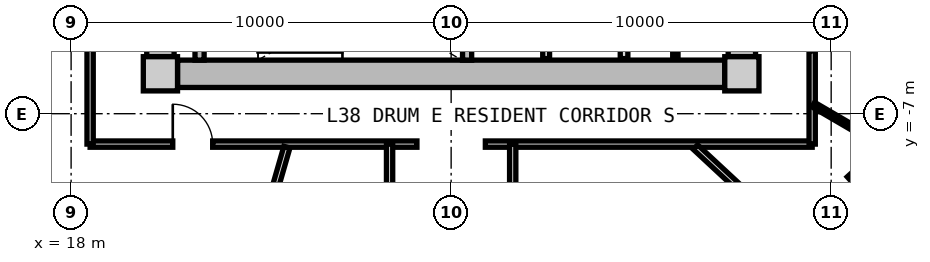
"""IFC4 building model, lengths in metres.
Left out: names, types, materials, properties, quantities, classifications, styles, units other than length and angle.
Written with IfcOpenShell. Run it as: python <this file> out.ifc"""

import sys

from ifc_helpers import new_model, si_unit, direction, frame, frame_2d, origin, origin_2d, place, context, subcontext, project, spatial, rectangle, extrude, source, transform, mapped, element, fill, save


model = new_model("IFC4")
c1 = context("Model", 3, precision=1e-05, world=origin(), true_north=direction((0.0, 1.0)))
c2 = subcontext(c1, "Body", "Model", "MODEL_VIEW")
j1 = project(units=[si_unit("LENGTHUNIT", "METRE"), si_unit("PLANEANGLEUNIT", "RADIAN")], contexts=[c1])
p1 = place(None, origin())
s1 = spatial("IfcSite", under=j1, at=p1, CompositionType="ELEMENT")
p2 = place(p1, origin())
s2 = spatial("IfcBuilding", under=s1, at=p2, CompositionType="ELEMENT")
p3 = place(p2, frame((0.0, 0.0, 123.7)))
s3 = spatial("IfcBuildingStorey", under=s2, at=p3, CompositionType="ELEMENT", Elevation=123.7)
m1 = source(origin(), c2, "Body", "SweptSolid", [
    extrude(rectangle(XDim=0.9, YDim=0.9, at=origin_2d()), origin(), (0.0, 0.0, 1.0), 3.05),
])
for number, where, z_axis, x_axis in (
    (1, (20.35, -5.95, 0.0), (0.0, 0.0, 1.0), (1.0, 0.0, 0.0)),
    (2, (35.65, -5.95, 0.0), (0.0, 0.0, 1.0), (1.0, 0.0, 0.0)),
):
    element("IfcColumn", number, at=place(p3, frame(where, z_axis=z_axis, x_axis=x_axis)), inside=s3, PredefinedType="COLUMN", context=c2, shape_type="MappedRepresentation", body=[
        mapped(m1, transform((0.0, 0.0, 0.0), x_axis=(1.0, 0.0, 0.0), y_axis=(0.0, 1.0, 0.0), z_axis=(0.0, 0.0, 1.0), scale=1.0)),
    ])
m2 = source(origin(), c2, "Body", "SweptSolid", [
    extrude(rectangle(XDim=14.4, YDim=0.72, at=frame_2d((7.2, 0.0))), origin(), (0.0, 0.0, 1.0), 2.79),
])
p4 = place(p3, frame((35.2, -5.95, 0.0), z_axis=(0.0, 0.0, 1.0), x_axis=(-1.0, 0.0, 0.0)))
e3 = element("IfcWall", 3, at=p4, inside=s3, PredefinedType="SHEAR", context=c2, shape_type="MappedRepresentation", body=[
    mapped(m2, transform((0.0, 0.0, 0.0), x_axis=(1.0, 0.0, 0.0), y_axis=(0.0, 1.0, 0.0), z_axis=(0.0, 0.0, 1.0), scale=1.0)),
])
m3 = source(origin(), c2, "Body", "SweptSolid", [
    extrude(rectangle(XDim=11.0, YDim=0.72, at=frame_2d((5.5, 0.0))), origin(), (0.0, 0.0, 1.0), 2.79),
])
p5 = place(p3, frame((20.35, -5.5, 0.0), z_axis=(0.0, 0.0, 1.0), x_axis=(0.0, 1.0, 0.0)))
e4 = element("IfcWall", 4, at=p5, inside=s3, PredefinedType="SHEAR", context=c2, shape_type="MappedRepresentation", body=[
    mapped(m3, transform((0.0, 0.0, 0.0), x_axis=(1.0, 0.0, 0.0), y_axis=(0.0, 1.0, 0.0), z_axis=(0.0, 0.0, 1.0), scale=1.0)),
])
p6 = place(p5, frame((3.8, 0.0, 0.0)))
e5 = element("IfcOpeningElement", 5, at=p6, cuts=e4, PredefinedType="OPENING", context=c2, shape_type="SweptSolid", body=[
    extrude(rectangle(XDim=1.2, YDim=2.15, at=frame_2d((0.6, 1.075))), frame((0.0, 0.37, 0.0), z_axis=(0.0, -1.0, 0.0), x_axis=(1.0, 0.0, 0.0)), (0.0, 0.0, 1.0), 0.74),
])
p7 = place(p3, frame((35.65, 5.5, 0.0), z_axis=(0.0, 0.0, 1.0), x_axis=(0.0, -1.0, 0.0)))
e6 = element("IfcWall", 6, at=p7, inside=s3, PredefinedType="SHEAR", context=c2, shape_type="MappedRepresentation", body=[
    mapped(m3, transform((0.0, 0.0, 0.0), x_axis=(1.0, 0.0, 0.0), y_axis=(0.0, 1.0, 0.0), z_axis=(0.0, 0.0, 1.0), scale=1.0)),
])
p8 = place(p7, frame((5.65, 0.0, 0.0)))
e7 = element("IfcOpeningElement", 7, at=p8, cuts=e6, PredefinedType="OPENING", context=c2, shape_type="SweptSolid", body=[
    extrude(rectangle(XDim=1.2, YDim=2.15, at=frame_2d((0.6, 1.075))), frame((0.0, 0.37, 0.0), z_axis=(0.0, -1.0, 0.0), x_axis=(1.0, 0.0, 0.0)), (0.0, 0.0, 1.0), 0.74),
])
m4 = source(origin(), c2, "Body", "SweptSolid", [
    extrude(rectangle(XDim=3.14, YDim=0.24, at=frame_2d((1.57, 0.0))), origin(), (0.0, 0.0, 1.0), 2.79),
])
for number, where, z_axis, x_axis in (
    (8, (21.38, -5.59, 0.0), (0.0, 0.0, 1.0), (0.0, 1.0, 0.0)),
    (9, (28.42, -5.59, 0.0), (0.0, 0.0, 1.0), (0.0, 1.0, 0.0)),
):
    element("IfcWall", number, at=place(p3, frame(where, z_axis=z_axis, x_axis=x_axis)), inside=s3, PredefinedType="PARTITIONING", context=c2, shape_type="MappedRepresentation", body=[
        mapped(m4, transform((0.0, 0.0, 0.0), x_axis=(1.0, 0.0, 0.0), y_axis=(0.0, 1.0, 0.0), z_axis=(0.0, 0.0, 1.0), scale=1.0)),
    ])
m5 = source(origin(), c2, "Body", "SweptSolid", [
    extrude(rectangle(XDim=3.8, YDim=0.2, at=frame_2d((1.9, 0.0))), origin(), (0.0, 0.0, 1.0), 2.775),
])
p9 = place(p3, frame((32.55, -5.55, 0.0), z_axis=(0.0, 0.0, 1.0), x_axis=(0.0, 1.0, 0.0)))
e10 = element("IfcWall", 10, at=p9, inside=s3, PredefinedType="PARTITIONING", context=c2, shape_type="MappedRepresentation", body=[
    mapped(m5, transform((0.0, 0.0, 0.0), x_axis=(1.0, 0.0, 0.0), y_axis=(0.0, 1.0, 0.0), z_axis=(0.0, 0.0, 1.0), scale=1.0)),
])
m6 = source(origin(), c2, "Body", "SweptSolid", [
    extrude(rectangle(XDim=3.22, YDim=0.18, at=frame_2d((1.61, 0.0))), origin(), (0.0, 0.0, 1.0), 2.775),
])
p10 = place(p3, frame((30.5, -5.55, 0.0), z_axis=(0.0, 0.0, 1.0), x_axis=(0.0, 1.0, 0.0)))
e11 = element("IfcWall", 11, at=p10, inside=s3, PredefinedType="PARTITIONING", context=c2, shape_type="MappedRepresentation", body=[
    mapped(m6, transform((0.0, 0.0, 0.0), x_axis=(1.0, 0.0, 0.0), y_axis=(0.0, 1.0, 0.0), z_axis=(0.0, 0.0, 1.0), scale=1.0)),
])
m7 = source(origin(), c2, "Body", "SweptSolid", [
    extrude(rectangle(XDim=3.8, YDim=0.14, at=frame_2d((1.9, 0.0))), origin(), (0.0, 0.0, 1.0), 2.775),
])
p11 = place(p3, frame((33.9, -5.55, 0.0), z_axis=(0.0, 0.0, 1.0), x_axis=(0.0, 1.0, 0.0)))
e12 = element("IfcWall", 12, at=p11, inside=s3, PredefinedType="PARTITIONING", context=c2, shape_type="MappedRepresentation", body=[
    mapped(m7, transform((0.0, 0.0, 0.0), x_axis=(1.0, 0.0, 0.0), y_axis=(0.0, 1.0, 0.0), z_axis=(0.0, 0.0, 1.0), scale=1.0)),
])
m8 = source(origin(), c2, "Body", "SweptSolid", [
    extrude(rectangle(XDim=8.6, YDim=0.165, at=frame_2d((4.3, 0.0))), origin(), (0.0, 0.0, 1.0), 2.775),
])
p12 = place(p3, frame((37.5, -7.8, 0.0), z_axis=(0.0, 0.0, 1.0), x_axis=(-1.0, 0.0, 0.0)))
e13 = element("IfcWall", 13, at=p12, inside=s3, PredefinedType="PARTITIONING", context=c2, shape_type="MappedRepresentation", body=[
    mapped(m8, transform((0.0, 0.0, 0.0), x_axis=(1.0, 0.0, 0.0), y_axis=(0.0, 1.0, 0.0), z_axis=(0.0, 0.0, 1.0), scale=1.0)),
])
p13 = place(p3, frame((27.1, -7.8, 0.0), z_axis=(0.0, 0.0, 1.0), x_axis=(-1.0, 0.0, 0.0)))
e14 = element("IfcWall", 14, at=p13, inside=s3, PredefinedType="PARTITIONING", context=c2, shape_type="MappedRepresentation", body=[
    mapped(m8, transform((0.0, 0.0, 0.0), x_axis=(1.0, 0.0, 0.0), y_axis=(0.0, 1.0, 0.0), z_axis=(0.0, 0.0, 1.0), scale=1.0)),
])
p14 = place(p13, frame((5.375, 0.0, 0.0)))
e15 = element("IfcOpeningElement", 15, at=p14, cuts=e14, PredefinedType="OPENING", context=c2, shape_type="SweptSolid", body=[
    extrude(rectangle(XDim=1.05, YDim=2.15, at=frame_2d((0.525, 1.075))), frame((0.0, 0.093, 0.0), z_axis=(0.0, -1.0, 0.0), x_axis=(1.0, 0.0, 0.0)), (0.0, 0.0, 1.0), 0.185),
])
m9 = source(origin(), c2, "Body", "SweptSolid", [
    extrude(rectangle(XDim=15.6, YDim=0.165, at=frame_2d((7.8, 0.0))), origin(), (0.0, 0.0, 1.0), 2.775),
])
p15 = place(p3, frame((18.5, -7.8, 0.0), z_axis=(0.0, 0.0, 1.0), x_axis=(0.0, 1.0, 0.0)))
e16 = element("IfcWall", 16, at=p15, inside=s3, PredefinedType="PARTITIONING", context=c2, shape_type="MappedRepresentation", body=[
    mapped(m9, transform((0.0, 0.0, 0.0), x_axis=(1.0, 0.0, 0.0), y_axis=(0.0, 1.0, 0.0), z_axis=(0.0, 0.0, 1.0), scale=1.0)),
])
p16 = place(p15, frame((10.383, 0.0, 0.0)))
e17 = element("IfcOpeningElement", 17, at=p16, cuts=e16, PredefinedType="OPENING", context=c2, shape_type="SweptSolid", body=[
    extrude(rectangle(XDim=1.05, YDim=2.15, at=frame_2d((0.525, 1.075))), frame((0.0, 0.093, 0.0), z_axis=(0.0, -1.0, 0.0), x_axis=(1.0, 0.0, 0.0)), (0.0, 0.0, 1.0), 0.185),
])
p17 = place(p15, frame((6.419, 0.0, 0.0)))
e18 = element("IfcOpeningElement", 18, at=p17, cuts=e16, PredefinedType="OPENING", context=c2, shape_type="SweptSolid", body=[
    extrude(rectangle(XDim=1.05, YDim=2.15, at=frame_2d((0.525, 1.075))), frame((0.0, 0.093, 0.0), z_axis=(0.0, -1.0, 0.0), x_axis=(1.0, 0.0, 0.0)), (0.0, 0.0, 1.0), 0.185),
])
p18 = place(p3, frame((37.5, 7.8, 0.0), z_axis=(0.0, 0.0, 1.0), x_axis=(0.0, -1.0, 0.0)))
e19 = element("IfcWall", 19, at=p18, inside=s3, PredefinedType="PARTITIONING", context=c2, shape_type="MappedRepresentation", body=[
    mapped(m9, transform((0.0, 0.0, 0.0), x_axis=(1.0, 0.0, 0.0), y_axis=(0.0, 1.0, 0.0), z_axis=(0.0, 0.0, 1.0), scale=1.0)),
])
p19 = place(p18, frame((12.094, 0.0, 0.0)))
e20 = element("IfcOpeningElement", 20, at=p19, cuts=e19, PredefinedType="OPENING", context=c2, shape_type="SweptSolid", body=[
    extrude(rectangle(XDim=1.05, YDim=2.15, at=frame_2d((0.525, 1.075))), frame((0.0, 0.093, 0.0), z_axis=(0.0, -1.0, 0.0), x_axis=(1.0, 0.0, 0.0)), (0.0, 0.0, 1.0), 0.185),
])
p20 = place(p18, frame((5.971, 0.0, 0.0)))
e21 = element("IfcOpeningElement", 21, at=p20, cuts=e19, PredefinedType="OPENING", context=c2, shape_type="SweptSolid", body=[
    extrude(rectangle(XDim=1.05, YDim=2.15, at=frame_2d((0.525, 1.075))), frame((0.0, 0.093, 0.0), z_axis=(0.0, -1.0, 0.0), x_axis=(1.0, 0.0, 0.0)), (0.0, 0.0, 1.0), 0.185),
])
p21 = place(p18, frame((3.324, 0.0, 0.0)))
e22 = element("IfcOpeningElement", 22, at=p21, cuts=e19, PredefinedType="OPENING", context=c2, shape_type="SweptSolid", body=[
    extrude(rectangle(XDim=0.92, YDim=2.1, at=frame_2d((0.46, 1.05))), frame((0.0, 0.093, 0.0), z_axis=(0.0, -1.0, 0.0), x_axis=(1.0, 0.0, 0.0)), (0.0, 0.0, 1.0), 0.185),
])
m10 = source(origin(), c2, "Body", "SweptSolid", [
    extrude(rectangle(XDim=8.989, YDim=0.165, at=frame_2d((4.495, 0.0))), origin(), (0.0, 0.0, 1.0), 2.275),
])
p22 = place(p3, frame((23.678, -7.88, 0.0), z_axis=(0.0, 0.0, 1.0), x_axis=(-0.27702323008, -0.960863221274, 0.0)))
e23 = element("IfcWall", 23, at=p22, inside=s3, PredefinedType="PARTITIONING", context=c2, shape_type="MappedRepresentation", body=[
    mapped(m10, transform((0.0, 0.0, 0.0), x_axis=(1.0, 0.0, 0.0), y_axis=(0.0, 1.0, 0.0), z_axis=(0.0, 0.0, 1.0), scale=1.0)),
])
m11 = source(origin(), c2, "Body", "SweptSolid", [
    extrude(rectangle(XDim=6.187, YDim=0.165, at=frame_2d((3.093, 0.0))), origin(), (0.0, 0.0, 1.0), 2.275),
])
p23 = place(p3, frame((34.429, -7.88, 0.0), z_axis=(0.0, 0.0, 1.0), x_axis=(0.732501077882, -0.680765870841, 0.0)))
e24 = element("IfcWall", 24, at=p23, inside=s3, PredefinedType="PARTITIONING", context=c2, shape_type="MappedRepresentation", body=[
    mapped(m11, transform((0.0, 0.0, 0.0), x_axis=(1.0, 0.0, 0.0), y_axis=(0.0, 1.0, 0.0), z_axis=(0.0, 0.0, 1.0), scale=1.0)),
])
m12 = source(origin(), c2, "Body", "SweptSolid", [
    extrude(rectangle(XDim=6.99, YDim=0.165, at=frame_2d((3.495, 0.0))), origin(), (0.0, 0.0, 1.0), 2.775),
])
p24 = place(p3, frame((26.38, -14.79, 0.0), z_axis=(0.0, 0.0, 1.0), x_axis=(0.0, 1.0, 0.0)))
e25 = element("IfcWall", 25, at=p24, inside=s3, PredefinedType="PARTITIONING", context=c2, shape_type="MappedRepresentation", body=[
    mapped(m12, transform((0.0, 0.0, 0.0), x_axis=(1.0, 0.0, 0.0), y_axis=(0.0, 1.0, 0.0), z_axis=(0.0, 0.0, 1.0), scale=1.0)),
])
p25 = place(p24, frame((2.97, 0.0, 0.0)))
e26 = element("IfcOpeningElement", 26, at=p25, cuts=e25, PredefinedType="OPENING", context=c2, shape_type="SweptSolid", body=[
    extrude(rectangle(XDim=1.05, YDim=2.15, at=frame_2d((0.525, 1.075))), frame((0.0, 0.093, 0.0), z_axis=(0.0, -1.0, 0.0), x_axis=(1.0, 0.0, 0.0)), (0.0, 0.0, 1.0), 0.185),
])
m13 = source(origin(), c2, "Body", "SweptSolid", [
    extrude(rectangle(XDim=6.99, YDim=0.165, at=frame_2d((3.495, 0.0))), origin(), (0.0, 0.0, 1.0), 2.275),
])
p26 = place(p3, frame((29.62, -14.79, 0.0), z_axis=(0.0, 0.0, 1.0), x_axis=(0.0, 1.0, 0.0)))
e27 = element("IfcWall", 27, at=p26, inside=s3, PredefinedType="PARTITIONING", context=c2, shape_type="MappedRepresentation", body=[
    mapped(m13, transform((0.0, 0.0, 0.0), x_axis=(1.0, 0.0, 0.0), y_axis=(0.0, 1.0, 0.0), z_axis=(0.0, 0.0, 1.0), scale=1.0)),
])
p27 = place(p26, frame((2.97, 0.0, 0.0)))
e28 = element("IfcOpeningElement", 28, at=p27, cuts=e27, PredefinedType="OPENING", context=c2, shape_type="SweptSolid", body=[
    extrude(rectangle(XDim=1.05, YDim=2.15, at=frame_2d((0.525, 1.075))), frame((0.0, 0.093, 0.0), z_axis=(0.0, -1.0, 0.0), x_axis=(1.0, 0.0, 0.0)), (0.0, 0.0, 1.0), 0.185),
])
m14 = source(origin(), c2, "Body", "SweptSolid", [
    extrude(rectangle(XDim=2.172, YDim=0.14, at=frame_2d((1.086, 0.0))), origin(), (0.0, 0.0, 1.0), 2.775),
])
p28 = place(p3, frame((37.53, -6.762, 0.0), z_axis=(0.0, 0.0, 1.0), x_axis=(0.863562702562, -0.504241468688, 0.0)))
e29 = element("IfcWall", 29, at=p28, inside=s3, PredefinedType="PARTITIONING", context=c2, shape_type="MappedRepresentation", body=[
    mapped(m14, transform((0.0, 0.0, 0.0), x_axis=(1.0, 0.0, 0.0), y_axis=(0.0, 1.0, 0.0), z_axis=(0.0, 0.0, 1.0), scale=1.0)),
])
m15 = source(origin(), c2, "Body", "SweptSolid", [
    extrude(rectangle(XDim=3.457, YDim=0.14, at=frame_2d((1.729, 0.0))), origin(), (0.0, 0.0, 1.0), 2.775),
])
p29 = place(p3, frame((39.405, -7.857, 0.0), z_axis=(0.0, 0.0, 1.0), x_axis=(-0.737567375492, -0.675273549467, 0.0)))
e30 = element("IfcWall", 30, at=p29, inside=s3, PredefinedType="PARTITIONING", context=c2, shape_type="MappedRepresentation", body=[
    mapped(m15, transform((0.0, 0.0, 0.0), x_axis=(1.0, 0.0, 0.0), y_axis=(0.0, 1.0, 0.0), z_axis=(0.0, 0.0, 1.0), scale=1.0)),
])
p30 = place(p29, frame((1.268, 0.0, 0.0)))
e31 = element("IfcOpeningElement", 31, at=p30, cuts=e30, PredefinedType="OPENING", context=c2, shape_type="SweptSolid", body=[
    extrude(rectangle(XDim=0.92, YDim=2.1, at=frame_2d((0.46, 1.05))), frame((0.0, 0.08, 0.0), z_axis=(0.0, -1.0, 0.0), x_axis=(1.0, 0.0, 0.0)), (0.0, 0.0, 1.0), 0.16),
])
m16 = source(origin(), c2, "Body", "SweptSolid", [
    extrude(rectangle(XDim=1.05, YDim=2.15, at=frame_2d((0.525, 1.075))), frame((0.0, 0.025, 0.0), z_axis=(0.0, -1.0, 0.0), x_axis=(1.0, 0.0, 0.0)), (0.0, 0.0, 1.0), 0.05),
])
p31 = place(p14, frame((1.05, 0.0, 0.0), z_axis=(0.0, 0.0, 1.0), x_axis=(-1.0, 0.0, 0.0)))
e32 = element("IfcDoor", 32, at=p31, inside=s3, OperationType="SINGLE_SWING_LEFT", PredefinedType="DOOR", context=c2, shape_type="MappedRepresentation", body=[
    mapped(m16, transform((0.0, 0.0, 0.0), x_axis=(1.0, 0.0, 0.0), y_axis=(0.0, 1.0, 0.0), z_axis=(0.0, 0.0, 1.0), scale=1.0)),
])
fill(e15, e32)
m17 = source(origin(), c2, "Body", "SweptSolid", [
    extrude(rectangle(XDim=0.92, YDim=2.1, at=frame_2d((0.46, 1.05))), frame((0.0, 0.025, 0.0), z_axis=(0.0, -1.0, 0.0), x_axis=(1.0, 0.0, 0.0)), (0.0, 0.0, 1.0), 0.05),
])
p32 = place(p30, origin())
e33 = element("IfcDoor", 33, at=p32, inside=s3, OperationType="SINGLE_SWING_LEFT", PredefinedType="DOOR", context=c2, shape_type="MappedRepresentation", body=[
    mapped(m17, transform((0.0, 0.0, 0.0), x_axis=(1.0, 0.0, 0.0), y_axis=(0.0, 1.0, 0.0), z_axis=(0.0, 0.0, 1.0), scale=1.0)),
])
fill(e31, e33)
save(model, sys.argv[1])
